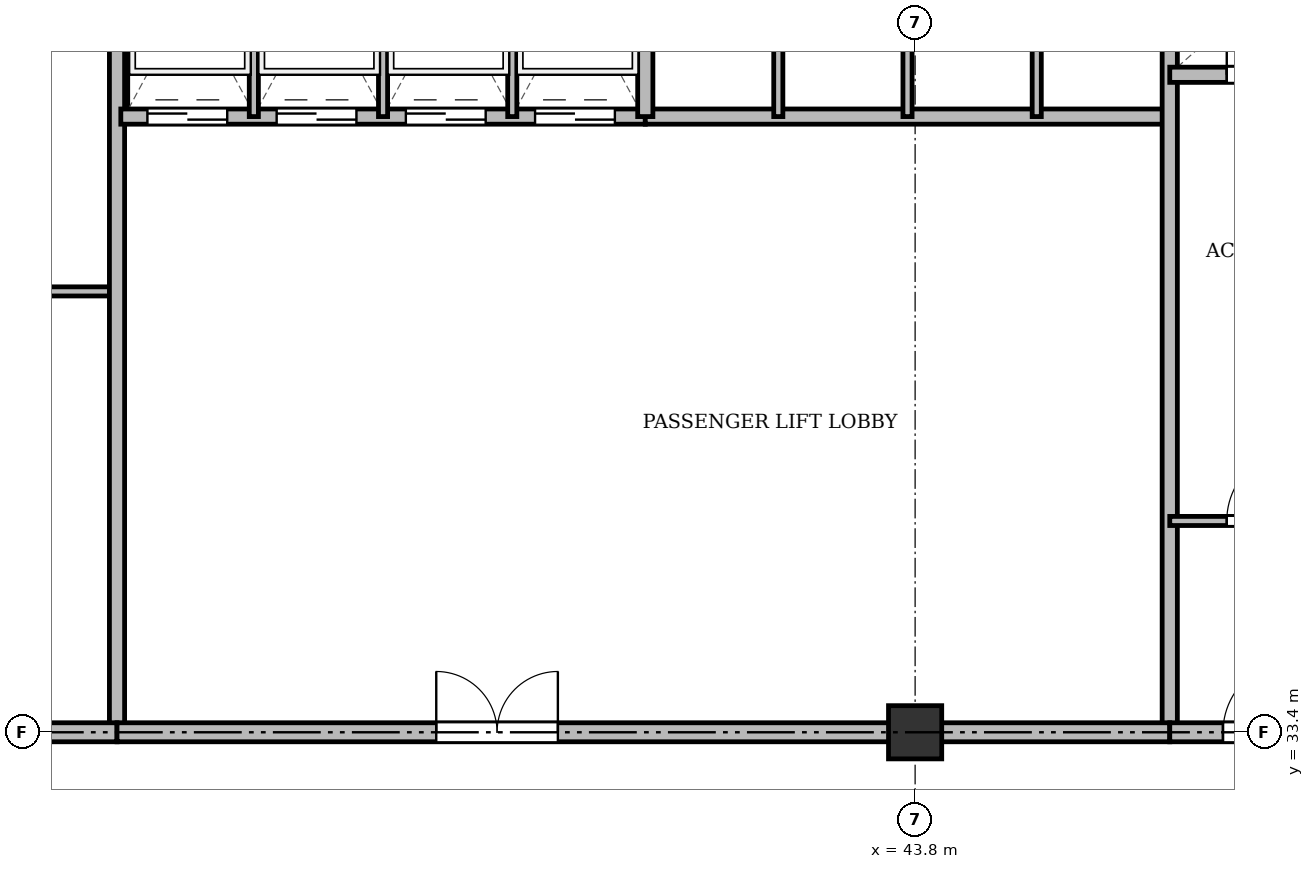
"""IFC4 building model, lengths in metres.
Left out: names, types, materials, properties, quantities, classifications, styles, units other than length and angle.
Written with IfcOpenShell. Run it as: python <this file> out.ifc"""

import sys

from ifc_helpers import new_model, si_unit, direction, frame, frame_2d, origin, origin_2d, place, context, subcontext, project, spatial, rectangle, extrude, source, transform, mapped, element, fill, save


model = new_model("IFC4")
c1 = context("Model", 3, precision=1e-05, world=origin(), true_north=direction((0.0, 1.0)))
c2 = subcontext(c1, "Body", "Model", "MODEL_VIEW")
j1 = project(units=[si_unit("LENGTHUNIT", "METRE"), si_unit("PLANEANGLEUNIT", "RADIAN")], contexts=[c1])
p1 = place(None, origin())
s1 = spatial("IfcSite", under=j1, at=p1, CompositionType="ELEMENT")
p2 = place(p1, origin())
s2 = spatial("IfcBuilding", under=s1, at=p2, CompositionType="ELEMENT")
p3 = place(p2, frame((0.0, 0.0, 139.3)))
s3 = spatial("IfcBuildingStorey", under=s2, at=p3, CompositionType="ELEMENT", Elevation=139.3)
m1 = source(origin(), c2, "Body", "SweptSolid", [
    extrude(rectangle(XDim=0.7, YDim=0.7, at=origin_2d()), origin(), (0.0, 0.0, 1.0), 3.6),
])
p4 = place(p3, frame((43.8, 33.4, 0.0), z_axis=(0.0, 0.0, 1.0), x_axis=(1.0, 0.0, 0.0)))
e1 = element("IfcColumn", 1, at=p4, inside=s3, PredefinedType="COLUMN", context=c2, shape_type="MappedRepresentation", body=[
    mapped(m1, transform((0.0, 0.0, 0.0), x_axis=(1.0, 0.0, 0.0), y_axis=(0.0, 1.0, 0.0), z_axis=(0.0, 0.0, 1.0), scale=1.0)),
])
p5 = place(p3, frame((26.3, 39.2, 0.0), z_axis=(0.0, 0.0, 1.0), x_axis=(1.0, 0.0, 0.0)))
e2 = element("IfcWall", 2, at=p5, inside=s3, PredefinedType="PARTITIONING", context=c2, shape_type="SweptSolid", body=[
    extrude(rectangle(XDim=7.0, YDim=0.12, at=frame_2d((3.5, 0.0))), origin(), (0.0, 0.0, 1.0), 2.85),
])
p6 = place(p5, frame((2.6, 0.0, 0.0)))
e3 = element("IfcOpeningElement", 3, at=p6, cuts=e2, PredefinedType="OPENING", context=c2, shape_type="SweptSolid", body=[
    extrude(rectangle(XDim=0.95, YDim=2.15, at=frame_2d((0.475, 1.075))), frame((0.0, 0.07, 0.0), z_axis=(0.0, -1.0, 0.0), x_axis=(1.0, 0.0, 0.0)), (0.0, 0.0, 1.0), 0.14),
])
p7 = place(p3, frame((33.3, 33.4, 0.0), z_axis=(0.0, 0.0, 1.0), x_axis=(0.0, 1.0, 0.0)))
e4 = element("IfcWall", 4, at=p7, inside=s3, PredefinedType="SOLIDWALL", context=c2, shape_type="SweptSolid", body=[
    extrude(rectangle(XDim=11.3, YDim=0.2, at=frame_2d((5.65, 0.0))), origin(), (0.0, 0.0, 1.0), 2.75),
])
p8 = place(p3, frame((33.35, 41.5, 0.0), z_axis=(0.0, 0.0, 1.0), x_axis=(1.0, 0.0, 0.0)))
e5 = element("IfcWall", 5, at=p8, inside=s3, PredefinedType="SOLIDWALL", context=c2, shape_type="SweptSolid", body=[
    extrude(rectangle(XDim=6.9, YDim=0.2, at=frame_2d((3.45, 0.0))), origin(), (0.0, 0.0, 1.0), 3.35),
])
p9 = place(p8, frame((0.35, 0.0, 0.0)))
e6 = element("IfcOpeningElement", 6, at=p9, cuts=e5, PredefinedType="OPENING", context=c2, shape_type="SweptSolid", body=[
    extrude(rectangle(XDim=1.05, YDim=2.15, at=frame_2d((0.525, 1.075))), frame((0.0, 0.11, 0.0), z_axis=(0.0, -1.0, 0.0), x_axis=(1.0, 0.0, 0.0)), (0.0, 0.0, 1.0), 0.22),
])
p10 = place(p8, frame((2.05, 0.0, 0.0)))
e7 = element("IfcOpeningElement", 7, at=p10, cuts=e5, PredefinedType="OPENING", context=c2, shape_type="SweptSolid", body=[
    extrude(rectangle(XDim=1.05, YDim=2.15, at=frame_2d((0.525, 1.075))), frame((0.0, 0.11, 0.0), z_axis=(0.0, -1.0, 0.0), x_axis=(1.0, 0.0, 0.0)), (0.0, 0.0, 1.0), 0.22),
])
p11 = place(p8, frame((3.75, 0.0, 0.0)))
e8 = element("IfcOpeningElement", 8, at=p11, cuts=e5, PredefinedType="OPENING", context=c2, shape_type="SweptSolid", body=[
    extrude(rectangle(XDim=1.05, YDim=2.15, at=frame_2d((0.525, 1.075))), frame((0.0, 0.11, 0.0), z_axis=(0.0, -1.0, 0.0), x_axis=(1.0, 0.0, 0.0)), (0.0, 0.0, 1.0), 0.22),
])
p12 = place(p8, frame((5.45, 0.0, 0.0)))
e9 = element("IfcOpeningElement", 9, at=p12, cuts=e5, PredefinedType="OPENING", context=c2, shape_type="SweptSolid", body=[
    extrude(rectangle(XDim=1.05, YDim=2.15, at=frame_2d((0.525, 1.075))), frame((0.0, 0.11, 0.0), z_axis=(0.0, -1.0, 0.0), x_axis=(1.0, 0.0, 0.0)), (0.0, 0.0, 1.0), 0.22),
])
for number, where, z_axis, x_axis in (
    (10, (35.1, 41.5, 0.0), (0.0, 0.0, 1.0), (0.0, 1.0, 0.0)),
    (11, (36.8, 41.5, 0.0), (0.0, 0.0, 1.0), (0.0, 1.0, 0.0)),
    (12, (38.5, 41.5, 0.0), (0.0, 0.0, 1.0), (0.0, 1.0, 0.0)),
):
    element("IfcWall", number, at=place(p3, frame(where, z_axis=z_axis, x_axis=x_axis)), inside=s3, PredefinedType="PARTITIONING", context=c2, shape_type="SweptSolid", body=[
        extrude(rectangle(XDim=3.2, YDim=0.12, at=frame_2d((1.6, 0.0))), origin(), (0.0, 0.0, 1.0), 3.35),
    ])
p13 = place(p3, frame((40.25, 41.5, 0.0), z_axis=(0.0, 0.0, 1.0), x_axis=(1.0, 0.0, 0.0)))
e13 = element("IfcWall", 13, at=p13, inside=s3, PredefinedType="SOLIDWALL", context=c2, shape_type="SweptSolid", body=[
    extrude(rectangle(XDim=6.9, YDim=0.2, at=frame_2d((3.45, 0.0))), origin(), (0.0, 0.0, 1.0), 2.85),
])
p14 = place(p3, frame((40.25, 41.5, 0.0), z_axis=(0.0, 0.0, 1.0), x_axis=(0.0, 1.0, 0.0)))
e14 = element("IfcWall", 14, at=p14, inside=s3, PredefinedType="SOLIDWALL", context=c2, shape_type="SweptSolid", body=[
    extrude(rectangle(XDim=3.2, YDim=0.2, at=frame_2d((1.6, 0.0))), origin(), (0.0, 0.0, 1.0), 3.35),
])
p15 = place(p3, frame((42.0, 41.5, 0.0), z_axis=(0.0, 0.0, 1.0), x_axis=(0.0, 1.0, 0.0)))
e15 = element("IfcWall", 15, at=p15, inside=s3, PredefinedType="PARTITIONING", context=c2, shape_type="SweptSolid", body=[
    extrude(rectangle(XDim=3.2, YDim=0.12, at=frame_2d((1.6, 0.0))), origin(), (0.0, 0.0, 1.0), 3.35),
])
p16 = place(p3, frame((43.7, 41.5, 0.0), z_axis=(0.0, 0.0, 1.0), x_axis=(0.0, 1.0, 0.0)))
e16 = element("IfcWall", 16, at=p16, inside=s3, PredefinedType="PARTITIONING", context=c2, shape_type="SweptSolid", body=[
    extrude(rectangle(XDim=3.2, YDim=0.12, at=frame_2d((1.6, 0.0))), origin(), (0.0, 0.0, 1.0), 2.85),
])
p17 = place(p3, frame((45.4, 41.5, 0.0), z_axis=(0.0, 0.0, 1.0), x_axis=(0.0, 1.0, 0.0)))
e17 = element("IfcWall", 17, at=p17, inside=s3, PredefinedType="PARTITIONING", context=c2, shape_type="SweptSolid", body=[
    extrude(rectangle(XDim=3.2, YDim=0.12, at=frame_2d((1.6, 0.0))), origin(), (0.0, 0.0, 1.0), 3.35),
])
p18 = place(p3, frame((47.15, 33.4, 0.0), z_axis=(0.0, 0.0, 1.0), x_axis=(0.0, 1.0, 0.0)))
e18 = element("IfcWall", 18, at=p18, inside=s3, PredefinedType="SOLIDWALL", context=c2, shape_type="SweptSolid", body=[
    extrude(rectangle(XDim=11.3, YDim=0.2, at=frame_2d((5.65, 0.0))), origin(), (0.0, 0.0, 1.0), 2.75),
])
p19 = place(p3, frame((26.3, 33.4, 0.0), z_axis=(0.0, 0.0, 1.0), x_axis=(1.0, 0.0, 0.0)))
e19 = element("IfcWall", 19, at=p19, inside=s3, PredefinedType="PARTITIONING", context=c2, shape_type="SweptSolid", body=[
    extrude(rectangle(XDim=7.0, YDim=0.25, at=frame_2d((3.5, 0.0))), origin(), (0.0, 0.0, 1.0), 2.75),
])
p20 = place(p19, frame((1.35, 0.0, 0.0)))
e20 = element("IfcOpeningElement", 20, at=p20, cuts=e19, PredefinedType="OPENING", context=c2, shape_type="SweptSolid", body=[
    extrude(rectangle(XDim=0.95, YDim=2.15, at=frame_2d((0.475, 1.075))), frame((0.0, 0.135, 0.0), z_axis=(0.0, -1.0, 0.0), x_axis=(1.0, 0.0, 0.0)), (0.0, 0.0, 1.0), 0.27),
])
p21 = place(p3, frame((33.3, 33.4, 0.0), z_axis=(0.0, 0.0, 1.0), x_axis=(1.0, 0.0, 0.0)))
e21 = element("IfcWall", 21, at=p21, inside=s3, PredefinedType="PARTITIONING", context=c2, shape_type="SweptSolid", body=[
    extrude(rectangle(XDim=13.85, YDim=0.25, at=frame_2d((6.925, 0.0))), origin(), (0.0, 0.0, 1.0), 2.75),
])
p22 = place(p21, frame((4.2, 0.0, 0.0)))
e22 = element("IfcOpeningElement", 22, at=p22, cuts=e21, PredefinedType="OPENING", context=c2, shape_type="SweptSolid", body=[
    extrude(rectangle(XDim=1.6, YDim=2.2, at=frame_2d((0.8, 1.1))), frame((0.0, 0.135, 0.0), z_axis=(0.0, -1.0, 0.0), x_axis=(1.0, 0.0, 0.0)), (0.0, 0.0, 1.0), 0.27),
])
p23 = place(p3, frame((47.15, 42.05, 0.0), z_axis=(0.0, 0.0, 1.0), x_axis=(1.0, 0.0, 0.0)))
e23 = element("IfcWall", 23, at=p23, inside=s3, PredefinedType="SOLIDWALL", context=c2, shape_type="SweptSolid", body=[
    extrude(rectangle(XDim=7.85, YDim=0.2, at=frame_2d((3.925, 0.0))), origin(), (0.0, 0.0, 1.0), 2.85),
])
p24 = place(p23, frame((0.75, 0.0, 0.0)))
e24 = element("IfcOpeningElement", 24, at=p24, cuts=e23, PredefinedType="OPENING", context=c2, shape_type="SweptSolid", body=[
    extrude(rectangle(XDim=0.9, YDim=2.1, at=frame_2d((0.45, 1.05))), frame((0.0, 0.11, 0.0), z_axis=(0.0, -1.0, 0.0), x_axis=(1.0, 0.0, 0.0)), (0.0, 0.0, 1.0), 0.22),
])
p25 = place(p23, frame((3.85, 0.0, 0.0)))
e25 = element("IfcOpeningElement", 25, at=p25, cuts=e23, PredefinedType="OPENING", context=c2, shape_type="SweptSolid", body=[
    extrude(rectangle(XDim=0.9, YDim=2.1, at=frame_2d((0.45, 1.05))), frame((0.0, 0.11, 0.0), z_axis=(0.0, -1.0, 0.0), x_axis=(1.0, 0.0, 0.0)), (0.0, 0.0, 1.0), 0.22),
])
p26 = place(p3, frame((47.15, 36.18, 0.0), z_axis=(0.0, 0.0, 1.0), x_axis=(1.0, 0.0, 0.0)))
e26 = element("IfcWall", 26, at=p26, inside=s3, PredefinedType="PARTITIONING", context=c2, shape_type="SweptSolid", body=[
    extrude(rectangle(XDim=5.3, YDim=0.12, at=frame_2d((2.65, 0.0))), origin(), (0.0, 0.0, 1.0), 2.85),
])
p27 = place(p26, frame((0.75, 0.0, 0.0)))
e27 = element("IfcOpeningElement", 27, at=p27, cuts=e26, PredefinedType="OPENING", context=c2, shape_type="SweptSolid", body=[
    extrude(rectangle(XDim=0.95, YDim=2.15, at=frame_2d((0.475, 1.075))), frame((0.0, 0.07, 0.0), z_axis=(0.0, -1.0, 0.0), x_axis=(1.0, 0.0, 0.0)), (0.0, 0.0, 1.0), 0.14),
])
p28 = place(p26, frame((3.45, 0.0, 0.0)))
e28 = element("IfcOpeningElement", 28, at=p28, cuts=e26, PredefinedType="OPENING", context=c2, shape_type="SweptSolid", body=[
    extrude(rectangle(XDim=0.95, YDim=2.15, at=frame_2d((0.475, 1.075))), frame((0.0, 0.07, 0.0), z_axis=(0.0, -1.0, 0.0), x_axis=(1.0, 0.0, 0.0)), (0.0, 0.0, 1.0), 0.14),
])
p29 = place(p3, frame((47.15, 33.4, 0.0), z_axis=(0.0, 0.0, 1.0), x_axis=(1.0, 0.0, 0.0)))
e29 = element("IfcWall", 29, at=p29, inside=s3, PredefinedType="PARTITIONING", context=c2, shape_type="SweptSolid", body=[
    extrude(rectangle(XDim=11.15, YDim=0.25, at=frame_2d((5.575, 0.0))), origin(), (0.0, 0.0, 1.0), 2.75),
])
p30 = place(p29, frame((0.7, 0.0, 0.0)))
e30 = element("IfcOpeningElement", 30, at=p30, cuts=e29, PredefinedType="OPENING", context=c2, shape_type="SweptSolid", body=[
    extrude(rectangle(XDim=0.95, YDim=2.15, at=frame_2d((0.475, 1.075))), frame((0.0, 0.135, 0.0), z_axis=(0.0, -1.0, 0.0), x_axis=(1.0, 0.0, 0.0)), (0.0, 0.0, 1.0), 0.27),
])
p31 = place(p29, frame((6.0, 0.0, 0.0)))
e31 = element("IfcOpeningElement", 31, at=p31, cuts=e29, PredefinedType="OPENING", context=c2, shape_type="SweptSolid", body=[
    extrude(rectangle(XDim=1.2, YDim=2.15, at=frame_2d((0.6, 1.075))), frame((0.0, 0.135, 0.0), z_axis=(0.0, -1.0, 0.0), x_axis=(1.0, 0.0, 0.0)), (0.0, 0.0, 1.0), 0.27),
])
m2 = source(origin(), c2, "Body", "SweptSolid", [
    extrude(rectangle(XDim=1.05, YDim=2.15, at=frame_2d((0.525, 1.075))), frame((0.0, 0.025, 0.0), z_axis=(0.0, -1.0, 0.0), x_axis=(1.0, 0.0, 0.0)), (0.0, 0.0, 1.0), 0.05),
])
p32 = place(p9, origin())
e32 = element("IfcDoor", 32, at=p32, inside=s3, OperationType="DOUBLE_DOOR_SLIDING", PredefinedType="DOOR", context=c2, shape_type="MappedRepresentation", body=[
    mapped(m2, transform((0.0, 0.0, 0.0), x_axis=(1.0, 0.0, 0.0), y_axis=(0.0, 1.0, 0.0), z_axis=(0.0, 0.0, 1.0), scale=1.0)),
])
fill(e6, e32)
p33 = place(p10, origin())
e33 = element("IfcDoor", 33, at=p33, inside=s3, OperationType="DOUBLE_DOOR_SLIDING", PredefinedType="DOOR", context=c2, shape_type="MappedRepresentation", body=[
    mapped(m2, transform((0.0, 0.0, 0.0), x_axis=(1.0, 0.0, 0.0), y_axis=(0.0, 1.0, 0.0), z_axis=(0.0, 0.0, 1.0), scale=1.0)),
])
fill(e7, e33)
p34 = place(p11, origin())
e34 = element("IfcDoor", 34, at=p34, inside=s3, OperationType="DOUBLE_DOOR_SLIDING", PredefinedType="DOOR", context=c2, shape_type="MappedRepresentation", body=[
    mapped(m2, transform((0.0, 0.0, 0.0), x_axis=(1.0, 0.0, 0.0), y_axis=(0.0, 1.0, 0.0), z_axis=(0.0, 0.0, 1.0), scale=1.0)),
])
fill(e8, e34)
p35 = place(p12, origin())
e35 = element("IfcDoor", 35, at=p35, inside=s3, OperationType="DOUBLE_DOOR_SLIDING", PredefinedType="DOOR", context=c2, shape_type="MappedRepresentation", body=[
    mapped(m2, transform((0.0, 0.0, 0.0), x_axis=(1.0, 0.0, 0.0), y_axis=(0.0, 1.0, 0.0), z_axis=(0.0, 0.0, 1.0), scale=1.0)),
])
fill(e9, e35)
m3 = source(origin(), c2, "Body", "SweptSolid", [
    extrude(rectangle(XDim=1.6, YDim=2.2, at=frame_2d((0.8, 1.1))), frame((0.0, 0.025, 0.0), z_axis=(0.0, -1.0, 0.0), x_axis=(1.0, 0.0, 0.0)), (0.0, 0.0, 1.0), 0.05),
])
p36 = place(p22, origin())
e36 = element("IfcDoor", 36, at=p36, inside=s3, OperationType="DOUBLE_DOOR_SINGLE_SWING", PredefinedType="DOOR", context=c2, shape_type="MappedRepresentation", body=[
    mapped(m3, transform((0.0, 0.0, 0.0), x_axis=(1.0, 0.0, 0.0), y_axis=(0.0, 1.0, 0.0), z_axis=(0.0, 0.0, 1.0), scale=1.0)),
])
fill(e22, e36)
m4 = source(origin(), c2, "Body", "SweptSolid", [
    extrude(rectangle(XDim=0.9, YDim=2.1, at=frame_2d((0.45, 1.05))), frame((0.0, 0.025, 0.0), z_axis=(0.0, -1.0, 0.0), x_axis=(1.0, 0.0, 0.0)), (0.0, 0.0, 1.0), 0.05),
])
p37 = place(p24, origin())
e37 = element("IfcDoor", 37, at=p37, inside=s3, OperationType="SINGLE_SWING_LEFT", PredefinedType="DOOR", context=c2, shape_type="MappedRepresentation", body=[
    mapped(m4, transform((0.0, 0.0, 0.0), x_axis=(1.0, 0.0, 0.0), y_axis=(0.0, 1.0, 0.0), z_axis=(0.0, 0.0, 1.0), scale=1.0)),
])
fill(e24, e37)
m5 = source(origin(), c2, "Body", "SweptSolid", [
    extrude(rectangle(XDim=0.95, YDim=2.15, at=frame_2d((0.475, 1.075))), frame((0.0, 0.025, 0.0), z_axis=(0.0, -1.0, 0.0), x_axis=(1.0, 0.0, 0.0)), (0.0, 0.0, 1.0), 0.05),
])
p38 = place(p27, origin())
e38 = element("IfcDoor", 38, at=p38, inside=s3, OperationType="SINGLE_SWING_RIGHT", PredefinedType="DOOR", context=c2, shape_type="MappedRepresentation", body=[
    mapped(m5, transform((0.0, 0.0, 0.0), x_axis=(1.0, 0.0, 0.0), y_axis=(0.0, 1.0, 0.0), z_axis=(0.0, 0.0, 1.0), scale=1.0)),
])
fill(e27, e38)
p39 = place(p30, origin())
e39 = element("IfcDoor", 39, at=p39, inside=s3, OperationType="SINGLE_SWING_RIGHT", PredefinedType="DOOR", context=c2, shape_type="MappedRepresentation", body=[
    mapped(m5, transform((0.0, 0.0, 0.0), x_axis=(1.0, 0.0, 0.0), y_axis=(0.0, 1.0, 0.0), z_axis=(0.0, 0.0, 1.0), scale=1.0)),
])
fill(e30, e39)
save(model, sys.argv[1])
